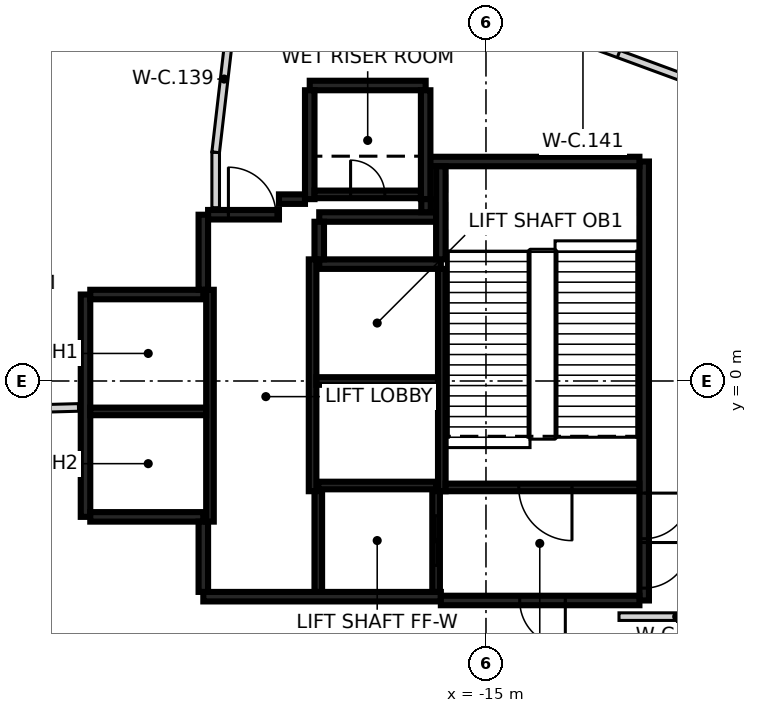
"""IFC4 building model, lengths in metres.
Left out: names, types, materials, properties, quantities, classifications, styles, units other than length and angle.
Written with IfcOpenShell. Run it as: python <this file> out.ifc"""

import sys

from ifc_helpers import new_model, si_unit, direction, frame, frame_2d, origin, place, context, subcontext, project, spatial, rectangle, extrude, element, fill, save


model = new_model("IFC4")
c1 = context("Model", 3, precision=1e-05, world=origin(), true_north=direction((0.0, 1.0)))
c2 = subcontext(c1, "Body", "Model", "MODEL_VIEW")
j1 = project(units=[si_unit("LENGTHUNIT", "METRE"), si_unit("PLANEANGLEUNIT", "RADIAN")], contexts=[c1])
p1 = place(None, origin())
s1 = spatial("IfcSite", under=j1, at=p1, CompositionType="ELEMENT")
p2 = place(p1, origin())
s2 = spatial("IfcBuilding", under=s1, at=p2, CompositionType="ELEMENT")
p3 = place(p2, frame((0.0, 0.0, 29.5)))
s3 = spatial("IfcBuildingStorey", under=s2, at=p3, CompositionType="ELEMENT", Elevation=29.5)
p4 = place(p3, frame((-10.837, 5.775, 0.0), z_axis=(0.0, 0.0, 1.0), x_axis=(0.0, -1.0, 0.0)))
e1 = element("IfcWall", 1, at=p4, inside=s3, PredefinedType="SHEAR", context=c2, shape_type="SweptSolid", body=[
    extrude(rectangle(XDim=11.55, YDim=0.25, at=frame_2d((5.775, 0.0))), origin(), (0.0, 0.0, 1.0), 5.025),
])
p5 = place(p4, frame((10.025, 0.0, 0.0)))
e2 = element("IfcOpeningElement", 2, at=p5, cuts=e1, PredefinedType="OPENING", context=c2, shape_type="SweptSolid", body=[
    extrude(rectangle(XDim=1.2, YDim=2.1, at=frame_2d((0.6, 1.05))), frame((0.0, 0.135, 0.0), z_axis=(0.0, -1.0, 0.0), x_axis=(1.0, 0.0, 0.0)), (0.0, 0.0, 1.0), 0.27),
])
p6 = place(p4, frame((8.725, 0.0, 0.0)))
e3 = element("IfcOpeningElement", 3, at=p6, cuts=e1, PredefinedType="OPENING", context=c2, shape_type="SweptSolid", body=[
    extrude(rectangle(XDim=1.2, YDim=2.1, at=frame_2d((0.6, 1.05))), frame((0.0, 0.135, 0.0), z_axis=(0.0, -1.0, 0.0), x_axis=(1.0, 0.0, 0.0)), (0.0, 0.0, 1.0), 0.27),
])
p7 = place(p3, frame((-16.187, -5.675, 0.0), z_axis=(0.0, 0.0, 1.0), x_axis=(-1.0, 0.0, 0.0)))
e4 = element("IfcWall", 4, at=p7, inside=s3, PredefinedType="SHEAR", context=c2, shape_type="SweptSolid", body=[
    extrude(rectangle(XDim=6.25, YDim=0.25, at=frame_2d((3.125, 0.0))), origin(), (0.0, 0.0, 1.0), 5.025),
])
p8 = place(p3, frame((-25.537, -3.575, 0.0), z_axis=(0.0, 0.0, 1.0), x_axis=(0.0, 1.0, 0.0)))
e5 = element("IfcWall", 5, at=p8, inside=s3, PredefinedType="SHEAR", context=c2, shape_type="SweptSolid", body=[
    extrude(rectangle(XDim=5.85, YDim=0.25, at=frame_2d((2.925, 0.0))), origin(), (0.0, 0.0, 1.0), 5.025),
])
p9 = place(p3, frame((-10.963, -5.775, 0.0), z_axis=(0.0, 0.0, 1.0), x_axis=(-1.0, 0.0, 0.0)))
e6 = element("IfcWall", 6, at=p9, inside=s3, PredefinedType="SHEAR", context=c2, shape_type="SweptSolid", body=[
    extrude(rectangle(XDim=5.225, YDim=0.25, at=frame_2d((2.612, 0.0))), origin(), (0.0, 0.0, 1.0), 5.025),
])
p10 = place(p9, frame((1.95, 0.0, 0.0)))
e7 = element("IfcOpeningElement", 7, at=p10, cuts=e6, PredefinedType="OPENING", context=c2, shape_type="SweptSolid", body=[
    extrude(rectangle(XDim=1.2, YDim=2.1, at=frame_2d((0.6, 1.05))), frame((0.0, 0.135, 0.0), z_axis=(0.0, -1.0, 0.0), x_axis=(1.0, 0.0, 0.0)), (0.0, 0.0, 1.0), 0.27),
])
p11 = place(p3, frame((-16.472, 5.775, 0.0), z_axis=(0.0, 0.0, 1.0), x_axis=(1.0, 0.0, 0.0)))
e8 = element("IfcWall", 8, at=p11, inside=s3, PredefinedType="SHEAR", context=c2, shape_type="SweptSolid", body=[
    extrude(rectangle(XDim=5.51, YDim=0.25, at=frame_2d((2.755, 0.0))), origin(), (0.0, 0.0, 1.0), 5.025),
])
p12 = place(p3, frame((-19.387, 3.075, 0.0), z_axis=(0.0, 0.0, 1.0), x_axis=(1.0, 0.0, 0.0)))
e9 = element("IfcWall", 9, at=p12, inside=s3, PredefinedType="SHEAR", context=c2, shape_type="SweptSolid", body=[
    extrude(rectangle(XDim=3.2, YDim=0.25, at=frame_2d((1.6, 0.0))), origin(), (0.0, 0.0, 1.0), 5.025),
])
for number, where, z_axis, x_axis in (
    (10, (-22.437, -3.575, 0.0), (0.0, 0.0, 1.0), (-1.0, 0.0, 0.0)),
    (11, (-25.412, 2.275, 0.0), (0.0, 0.0, 1.0), (1.0, 0.0, 0.0)),
):
    element("IfcWall", number, at=place(p3, frame(where, z_axis=z_axis, x_axis=x_axis)), inside=s3, PredefinedType="SHEAR", context=c2, shape_type="SweptSolid", body=[
        extrude(rectangle(XDim=2.975, YDim=0.25, at=frame_2d((1.487, 0.0))), origin(), (0.0, 0.0, 1.0), 5.025),
    ])
p13 = place(p3, frame((-19.637, 7.775, 0.0), z_axis=(0.0, 0.0, 1.0), x_axis=(1.0, 0.0, 0.0)))
e12 = element("IfcWall", 12, at=p13, inside=s3, PredefinedType="SHEAR", context=c2, shape_type="SweptSolid", body=[
    extrude(rectangle(XDim=3.05, YDim=0.25, at=frame_2d((1.525, 0.0))), origin(), (0.0, 0.0, 1.0), 5.025),
])
for number, where, z_axis, x_axis in (
    (13, (-16.587, 7.65, 0.0), (0.0, 0.0, 1.0), (0.0, -1.0, 0.0)),
    (14, (-19.637, 4.785, 0.0), (0.0, 0.0, 1.0), (0.0, 1.0, 0.0)),
):
    element("IfcWall", number, at=place(p3, frame(where, z_axis=z_axis, x_axis=x_axis)), inside=s3, PredefinedType="SHEAR", context=c2, shape_type="SweptSolid", body=[
        extrude(rectangle(XDim=2.865, YDim=0.25, at=frame_2d((1.432, 0.0))), origin(), (0.0, 0.0, 1.0), 5.025),
    ])
p14 = place(p3, frame((-16.302, 4.315, 0.0), z_axis=(0.0, 0.0, 1.0), x_axis=(-1.0, 0.0, 0.0)))
e15 = element("IfcWall", 15, at=p14, inside=s3, PredefinedType="SHEAR", context=c2, shape_type="SweptSolid", body=[
    extrude(rectangle(XDim=3.085, YDim=0.25, at=frame_2d((1.542, 0.0))), origin(), (0.0, 0.0, 1.0), 5.025),
])
p15 = place(p3, frame((-16.187, 3.2, 0.0), z_axis=(0.0, 0.0, 1.0), x_axis=(0.0, 1.0, 0.0)))
e16 = element("IfcWall", 16, at=p15, inside=s3, PredefinedType="SHEAR", context=c2, shape_type="SweptSolid", body=[
    extrude(rectangle(XDim=2.449, YDim=0.25, at=frame_2d((1.225, 0.0))), origin(), (0.0, 0.0, 1.0), 5.025),
])
p16 = place(p3, frame((-22.437, 2.4, 0.0), z_axis=(0.0, 0.0, 1.0), x_axis=(0.0, 1.0, 0.0)))
e17 = element("IfcWall", 17, at=p16, inside=s3, PredefinedType="SHEAR", context=c2, shape_type="SweptSolid", body=[
    extrude(rectangle(XDim=1.975, YDim=0.25, at=frame_2d((0.987, 0.0))), origin(), (0.0, 0.0, 1.0), 5.025),
])
p17 = place(p3, frame((-22.437, -5.55, 0.0), z_axis=(0.0, 0.0, 1.0), x_axis=(0.0, 1.0, 0.0)))
e18 = element("IfcWall", 18, at=p17, inside=s3, PredefinedType="SHEAR", context=c2, shape_type="SweptSolid", body=[
    extrude(rectangle(XDim=1.849, YDim=0.25, at=frame_2d((0.925, 0.0))), origin(), (0.0, 0.0, 1.0), 5.025),
])
p18 = place(p3, frame((-22.312, 4.375, 0.0), z_axis=(0.0, 0.0, 1.0), x_axis=(1.0, 0.0, 0.0)))
e19 = element("IfcWall", 19, at=p18, inside=s3, PredefinedType="SHEAR", context=c2, shape_type="SweptSolid", body=[
    extrude(rectangle(XDim=1.865, YDim=0.25, at=frame_2d((0.932, 0.0))), origin(), (0.0, 0.0, 1.0), 5.025),
])
p19 = place(p18, frame((0.535, 0.0, 0.0)))
e20 = element("IfcOpeningElement", 20, at=p19, cuts=e19, PredefinedType="OPENING", context=c2, shape_type="SweptSolid", body=[
    extrude(rectangle(XDim=1.25, YDim=2.1, at=frame_2d((0.625, 1.05))), frame((0.0, 0.135, 0.0), z_axis=(0.0, -1.0, 0.0), x_axis=(1.0, 0.0, 0.0)), (0.0, 0.0, 1.0), 0.27),
])
p20 = place(p3, frame((-19.387, 4.19, 0.0), z_axis=(0.0, 0.0, 1.0), x_axis=(0.0, -1.0, 0.0)))
e21 = element("IfcWall", 21, at=p20, inside=s3, PredefinedType="SHEAR", context=c2, shape_type="SweptSolid", body=[
    extrude(rectangle(XDim=0.989, YDim=0.25, at=frame_2d((0.495, 0.0))), origin(), (0.0, 0.0, 1.0), 5.025),
])
p21 = place(p3, frame((-20.447, 4.785, 0.0), z_axis=(0.0, 0.0, 1.0), x_axis=(1.0, 0.0, 0.0)))
e22 = element("IfcWall", 22, at=p21, inside=s3, PredefinedType="SHEAR", context=c2, shape_type="SweptSolid", body=[
    extrude(rectangle(XDim=0.685, YDim=0.25, at=frame_2d((0.342, 0.0))), origin(), (0.0, 0.0, 1.0), 5.025),
])
p22 = place(p3, frame((-16.577, 4.785, 0.0), z_axis=(0.0, 0.0, 1.0), x_axis=(0.0, -1.0, 0.0)))
e23 = element("IfcWall", 23, at=p22, inside=s3, PredefinedType="SHEAR", context=c2, shape_type="SweptSolid", body=[
    extrude(rectangle(XDim=0.344, YDim=0.25, at=frame_2d((0.172, 0.0))), origin(), (0.0, 0.0, 1.0), 5.025),
])
p23 = place(p3, frame((-16.162, 2.951, 0.0), z_axis=(0.0, 0.0, 1.0), x_axis=(0.0, -1.0, 0.0)))
e24 = element("IfcWall", 24, at=p23, inside=s3, PredefinedType="SHEAR", context=c2, shape_type="SweptSolid", body=[
    extrude(rectangle(XDim=5.851, YDim=0.2, at=frame_2d((2.925, 0.0))), origin(), (0.0, 0.0, 1.0), 5.025),
])
for number, where, z_axis, x_axis in (
    (25, (-19.562, -2.9, 0.0), (0.0, 0.0, 1.0), (0.0, 1.0, 0.0)),
    (26, (-22.262, 2.4, 0.0), (0.0, 0.0, 1.0), (0.0, -1.0, 0.0)),
):
    element("IfcWall", number, at=place(p3, frame(where, z_axis=z_axis, x_axis=x_axis)), inside=s3, PredefinedType="SHEAR", context=c2, shape_type="SweptSolid", body=[
        extrude(rectangle(XDim=6.1, YDim=0.2, at=frame_2d((3.05, 0.0))), origin(), (0.0, 0.0, 1.0), 5.025),
    ])
p24 = place(p3, frame((-10.963, -2.8, 0.0), z_axis=(0.0, 0.0, 1.0), x_axis=(-1.0, 0.0, 0.0)))
e27 = element("IfcWall", 27, at=p24, inside=s3, PredefinedType="SHEAR", context=c2, shape_type="SweptSolid", body=[
    extrude(rectangle(XDim=5.098, YDim=0.2, at=frame_2d((2.549, 0.0))), origin(), (0.0, 0.0, 1.0), 5.025),
])
p25 = place(p24, frame((1.774, 0.0, 0.0)))
e28 = element("IfcOpeningElement", 28, at=p25, cuts=e27, PredefinedType="OPENING", context=c2, shape_type="SweptSolid", body=[
    extrude(rectangle(XDim=1.4, YDim=2.1, at=frame_2d((0.7, 1.05))), frame((0.0, 0.11, 0.0), z_axis=(0.0, -1.0, 0.0), x_axis=(1.0, 0.0, 0.0)), (0.0, 0.0, 1.0), 0.22),
])
p26 = place(p3, frame((-16.263, 0.0, 0.0), z_axis=(0.0, 0.0, 1.0), x_axis=(-1.0, 0.0, 0.0)))
e29 = element("IfcWall", 29, at=p26, inside=s3, PredefinedType="SHEAR", context=c2, shape_type="SweptSolid", body=[
    extrude(rectangle(XDim=3.198, YDim=0.2, at=frame_2d((1.599, 0.0))), origin(), (0.0, 0.0, 1.0), 5.025),
])
p27 = place(p3, frame((-22.363, -0.8, 0.0), z_axis=(0.0, 0.0, 1.0), x_axis=(-1.0, 0.0, 0.0)))
e30 = element("IfcWall", 30, at=p27, inside=s3, PredefinedType="SHEAR", context=c2, shape_type="SweptSolid", body=[
    extrude(rectangle(XDim=3.048, YDim=0.2, at=frame_2d((1.524, 0.0))), origin(), (0.0, 0.0, 1.0), 5.025),
])
p28 = place(p3, frame((-19.511, 4.91, 0.0), z_axis=(0.0, 0.0, 1.0), x_axis=(1.0, 0.0, 0.0)))
e31 = element("IfcWall", 31, at=p28, inside=s3, PredefinedType="SHEAR", context=c2, shape_type="SweptSolid", body=[
    extrude(rectangle(XDim=2.798, YDim=0.2, at=frame_2d((1.399, 0.0))), origin(), (0.0, 0.0, 1.0), 5.025),
])
p29 = place(p28, frame((0.949, 0.0, 0.0)))
e32 = element("IfcOpeningElement", 32, at=p29, cuts=e31, PredefinedType="OPENING", context=c2, shape_type="SweptSolid", body=[
    extrude(rectangle(XDim=0.9, YDim=2.1, at=frame_2d((0.45, 1.05))), frame((0.0, 0.11, 0.0), z_axis=(0.0, -1.0, 0.0), x_axis=(1.0, 0.0, 0.0)), (0.0, 0.0, 1.0), 0.22),
])
p30 = place(p3, frame((-19.412, -2.75, 0.0), z_axis=(0.0, 0.0, 1.0), x_axis=(1.0, 0.0, 0.0)))
e33 = element("IfcWall", 33, at=p30, inside=s3, PredefinedType="SHEAR", context=c2, shape_type="SweptSolid", body=[
    extrude(rectangle(XDim=3.1, YDim=0.2, at=frame_2d((1.55, 0.0))), origin(), (0.0, 0.0, 1.0), 5.025),
])
p31 = place(p3, frame((-16.312, -2.898, 0.0), z_axis=(0.0, 0.0, 1.0), x_axis=(0.0, -1.0, 0.0)))
e34 = element("IfcWall", 34, at=p31, inside=s3, PredefinedType="SHEAR", context=c2, shape_type="SweptSolid", body=[
    extrude(rectangle(XDim=2.651, YDim=0.2, at=frame_2d((1.325, 0.0))), origin(), (0.0, 0.0, 1.0), 5.025),
])
p32 = place(p31, frame((0.652, 0.0, 0.0)))
e35 = element("IfcOpeningElement", 35, at=p32, cuts=e34, PredefinedType="OPENING", context=c2, shape_type="SweptSolid", body=[
    extrude(rectangle(XDim=1.3, YDim=2.1, at=frame_2d((0.65, 1.05))), frame((0.0, 0.11, 0.0), z_axis=(0.0, -1.0, 0.0), x_axis=(1.0, 0.0, 0.0)), (0.0, 0.0, 1.0), 0.22),
])
p33 = place(p3, frame((-19.412, -5.549, 0.0), z_axis=(0.0, 0.0, 1.0), x_axis=(0.0, 1.0, 0.0)))
e36 = element("IfcWall", 36, at=p33, inside=s3, PredefinedType="SHEAR", context=c2, shape_type="SweptSolid", body=[
    extrude(rectangle(XDim=2.651, YDim=0.2, at=frame_2d((1.325, 0.0))), origin(), (0.0, 0.0, 1.0), 5.025),
])
p34 = place(p3, frame((-22.112, 4.56, 0.0), z_axis=(0.0, 0.0, 1.0), x_axis=(0.0, 1.0, 0.0)))
e37 = element("IfcWall", 37, at=p34, inside=s3, PredefinedType="PARTITIONING", context=c2, shape_type="SweptSolid", body=[
    extrude(rectangle(XDim=1.459, YDim=0.2, at=frame_2d((0.729, 0.0))), origin(), (0.0, 0.0, 1.0), 5.025),
])
p35 = place(p3, frame((-22.112, 6.019, 0.0), z_axis=(0.0, 0.0, 1.0), x_axis=(0.115302898674, 0.993330378856, 0.0)))
e38 = element("IfcWall", 38, at=p35, inside=s3, PredefinedType="PARTITIONING", context=c2, shape_type="SweptSolid", body=[
    extrude(rectangle(XDim=3.877, YDim=0.2, at=frame_2d((1.938, 0.0))), origin(), (0.0, 0.0, 1.0), 5.025),
])
p36 = place(p3, frame((-15.833, 10.193, 0.0), z_axis=(0.0, 0.0, 1.0), x_axis=(0.938576941318, -0.345070029453, 0.0)))
e39 = element("IfcWall", 39, at=p36, inside=s3, PredefinedType="PARTITIONING", context=c2, shape_type="SweptSolid", body=[
    extrude(rectangle(XDim=7.213, YDim=0.2, at=frame_2d((3.606, 0.0))), origin(), (0.0, 0.0, 1.0), 5.025),
])
p37 = place(p36, frame((2.606, 0.0, 0.0)))
e40 = element("IfcOpeningElement", 40, at=p37, cuts=e39, PredefinedType="OPENING", context=c2, shape_type="SweptSolid", body=[
    extrude(rectangle(XDim=2.0, YDim=2.1, at=frame_2d((1.0, 1.05))), frame((0.0, 0.11, 0.0), z_axis=(0.0, -1.0, 0.0), x_axis=(1.0, 0.0, 0.0)), (0.0, 0.0, 1.0), 0.22),
])
p38 = place(p3, frame((-11.5, -6.2, 0.0), z_axis=(0.0, 0.0, 1.0), x_axis=(1.0, 0.0, 0.0)))
e41 = element("IfcWall", 41, at=p38, inside=s3, PredefinedType="PARTITIONING", context=c2, shape_type="SweptSolid", body=[
    extrude(rectangle(XDim=3.038, YDim=0.2, at=frame_2d((1.519, 0.0))), origin(), (0.0, 0.0, 1.0), 5.025),
])
p39 = place(p3, frame((-35.978, -0.973, 0.0), z_axis=(0.0, 0.0, 1.0), x_axis=(0.999634552885, 0.027032585509, 0.0)))
e42 = element("IfcWall", 42, at=p39, inside=s3, PredefinedType="PARTITIONING", context=c2, shape_type="SweptSolid", body=[
    extrude(rectangle(XDim=10.26, YDim=0.2, at=frame_2d((5.13, 0.0))), origin(), (0.0, 0.0, 1.0), 5.025),
])
p40 = place(p3, frame((-12.065, -16.93, 0.0), z_axis=(0.0, 0.0, 1.0), x_axis=(0.580338456909, 0.814375389751, 0.0)))
e43 = element("IfcWall", 43, at=p40, inside=s3, PredefinedType="PARTITIONING", context=c2, shape_type="SweptSolid", body=[
    extrude(rectangle(XDim=13.353, YDim=0.2, at=frame_2d((6.676, 0.0))), origin(), (0.0, 0.0, 1.0), 5.025),
])
p41 = place(p32, origin())
e44 = element("IfcDoor", 44, at=p41, inside=s3, OperationType="SLIDING_TO_RIGHT", PredefinedType="DOOR", context=c2, shape_type="SweptSolid", body=[
    extrude(rectangle(XDim=1.3, YDim=2.1, at=frame_2d((0.65, 1.05))), frame((0.0, 0.025, 0.0), z_axis=(0.0, -1.0, 0.0), x_axis=(1.0, 0.0, 0.0)), (0.0, 0.0, 1.0), 0.05),
])
fill(e35, e44)
p42 = place(p19, origin())
e45 = element("IfcDoor", 45, at=p42, inside=s3, OperationType="SINGLE_SWING_LEFT", PredefinedType="DOOR", context=c2, shape_type="SweptSolid", body=[
    extrude(rectangle(XDim=1.25, YDim=2.1, at=frame_2d((0.625, 1.05))), frame((0.0, 0.025, 0.0), z_axis=(0.0, -1.0, 0.0), x_axis=(1.0, 0.0, 0.0)), (0.0, 0.0, 1.0), 0.05),
])
fill(e20, e45)
p43 = place(p5, origin())
e46 = element("IfcDoor", 46, at=p43, inside=s3, OperationType="SINGLE_SWING_LEFT", PredefinedType="DOOR", context=c2, shape_type="SweptSolid", body=[
    extrude(rectangle(XDim=1.2, YDim=2.1, at=frame_2d((0.6, 1.05))), frame((0.0, 0.025, 0.0), z_axis=(0.0, -1.0, 0.0), x_axis=(1.0, 0.0, 0.0)), (0.0, 0.0, 1.0), 0.05),
])
fill(e2, e46)
p44 = place(p6, origin())
e47 = element("IfcDoor", 47, at=p44, inside=s3, OperationType="SINGLE_SWING_RIGHT", PredefinedType="DOOR", context=c2, shape_type="SweptSolid", body=[
    extrude(rectangle(XDim=1.2, YDim=2.1, at=frame_2d((0.6, 1.05))), frame((0.0, 0.025, 0.0), z_axis=(0.0, -1.0, 0.0), x_axis=(1.0, 0.0, 0.0)), (0.0, 0.0, 1.0), 0.05),
])
fill(e3, e47)
p45 = place(p25, origin())
e48 = element("IfcDoor", 48, at=p45, inside=s3, OperationType="SINGLE_SWING_RIGHT", PredefinedType="DOOR", context=c2, shape_type="SweptSolid", body=[
    extrude(rectangle(XDim=1.4, YDim=2.1, at=frame_2d((0.7, 1.05))), frame((0.0, 0.025, 0.0), z_axis=(0.0, -1.0, 0.0), x_axis=(1.0, 0.0, 0.0)), (0.0, 0.0, 1.0), 0.05),
])
fill(e28, e48)
p46 = place(p29, origin())
e49 = element("IfcDoor", 49, at=p46, inside=s3, OperationType="SINGLE_SWING_LEFT", PredefinedType="DOOR", context=c2, shape_type="SweptSolid", body=[
    extrude(rectangle(XDim=0.9, YDim=2.1, at=frame_2d((0.45, 1.05))), frame((0.0, 0.025, 0.0), z_axis=(0.0, -1.0, 0.0), x_axis=(1.0, 0.0, 0.0)), (0.0, 0.0, 1.0), 0.05),
])
fill(e32, e49)
p47 = place(p10, origin())
e50 = element("IfcDoor", 50, at=p47, inside=s3, OperationType="SINGLE_SWING_LEFT", PredefinedType="DOOR", context=c2, shape_type="SweptSolid", body=[
    extrude(rectangle(XDim=1.2, YDim=2.1, at=frame_2d((0.6, 1.05))), frame((0.0, 0.025, 0.0), z_axis=(0.0, -1.0, 0.0), x_axis=(1.0, 0.0, 0.0)), (0.0, 0.0, 1.0), 0.05),
])
fill(e7, e50)
p48 = place(p37, origin())
e51 = element("IfcDoor", 51, at=p48, inside=s3, OperationType="DOUBLE_DOOR_SINGLE_SWING", PredefinedType="DOOR", context=c2, shape_type="SweptSolid", body=[
    extrude(rectangle(XDim=2.0, YDim=2.1, at=frame_2d((1.0, 1.05))), frame((0.0, 0.025, 0.0), z_axis=(0.0, -1.0, 0.0), x_axis=(1.0, 0.0, 0.0)), (0.0, 0.0, 1.0), 0.05),
])
fill(e40, e51)
save(model, sys.argv[1])
